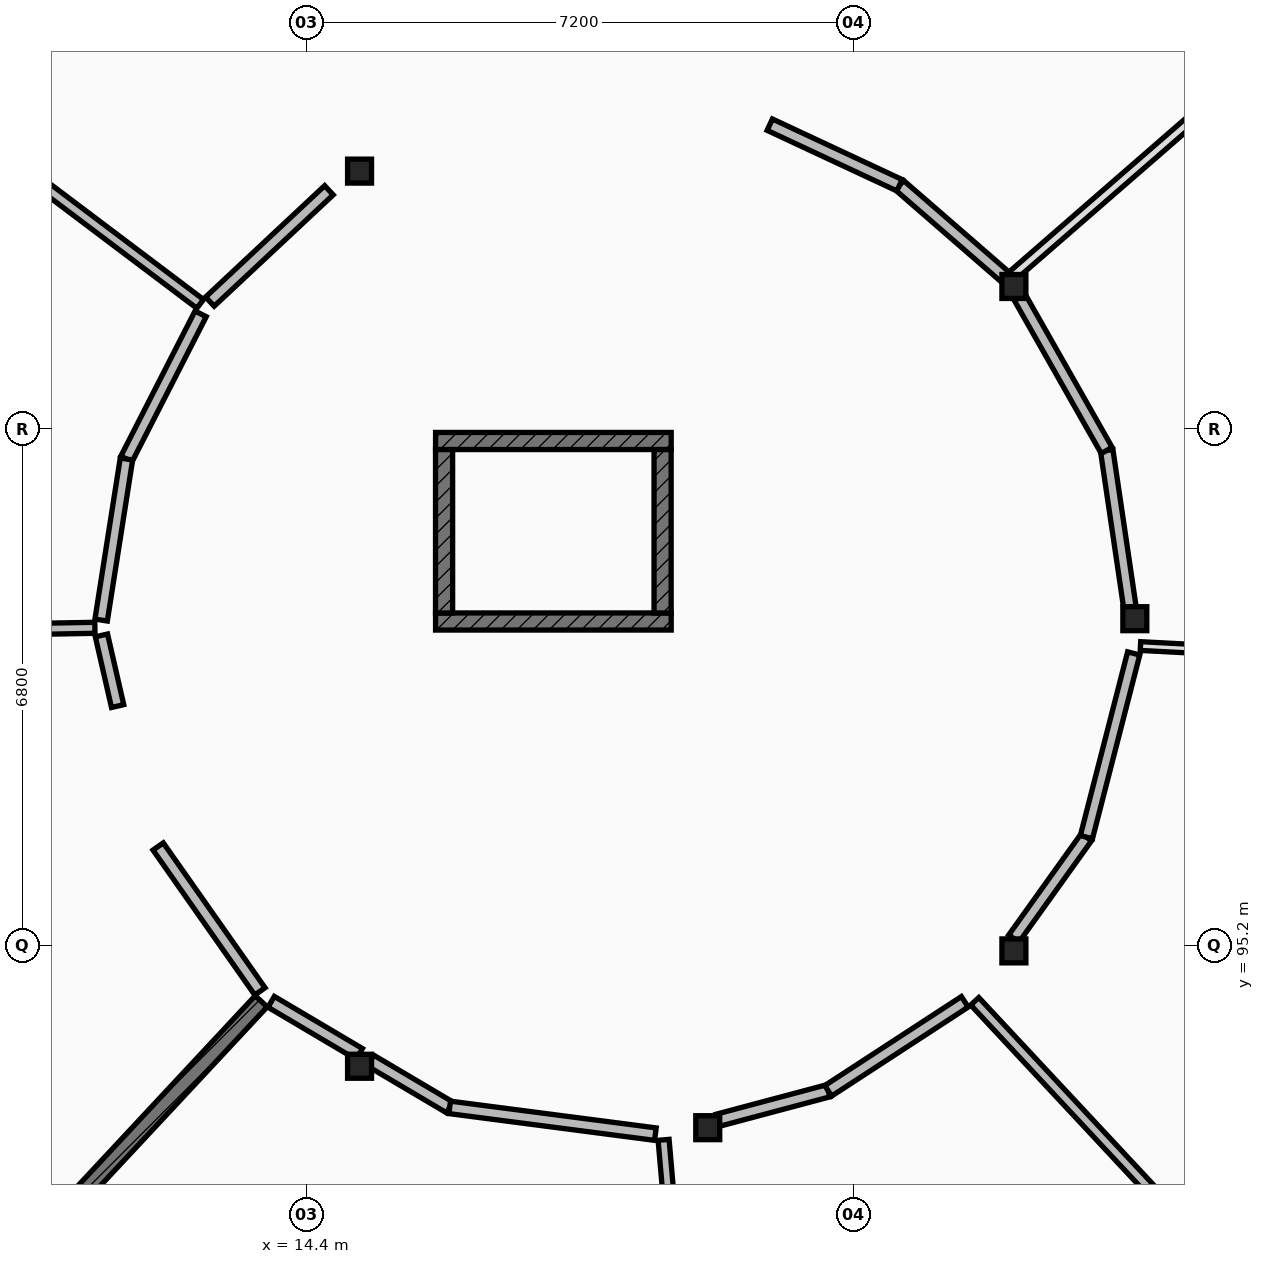
"""IFC4 building model, lengths in metres.
Left out: names, types, materials, properties, quantities, classifications, styles, units other than length and angle.
Written with IfcOpenShell. Run it as: python <this file> out.ifc"""

import sys

from ifc_helpers import new_model, si_unit, direction, frame, frame_2d, origin, origin_2d, place, context, subcontext, project, spatial, rectangle, extrude, element, fill, save


model = new_model("IFC4")
c1 = context("Model", 3, precision=1e-05, world=origin(), true_north=direction((0.0, 1.0)))
c2 = subcontext(c1, "Body", "Model", "MODEL_VIEW")
j1 = project(units=[si_unit("LENGTHUNIT", "METRE"), si_unit("PLANEANGLEUNIT", "RADIAN")], contexts=[c1])
p1 = place(None, origin())
s1 = spatial("IfcSite", under=j1, at=p1, CompositionType="ELEMENT")
p2 = place(p1, origin())
s2 = spatial("IfcBuilding", under=s1, at=p2, CompositionType="ELEMENT")
p3 = place(p2, frame((0.0, 0.0, 12.95)))
s3 = spatial("IfcBuildingStorey", under=s2, at=p3, CompositionType="ELEMENT", Elevation=12.95)
for number, where, z_axis, x_axis in (
    (1, (25.3, 99.5, 0.0), (0.0, 0.0, 1.0), (1.0, 0.0, 0.0)),
    (2, (23.709, 103.871, 0.0), (0.0, 0.0, 1.0), (1.0, 0.0, 0.0)),
    (3, (15.1, 105.389, 0.0), (0.0, 0.0, 1.0), (1.0, 0.0, 0.0)),
    (4, (15.1, 93.611, 0.0), (0.0, 0.0, 1.0), (1.0, 0.0, 0.0)),
    (5, (19.681, 92.803, 0.0), (0.0, 0.0, 1.0), (1.0, 0.0, 0.0)),
    (6, (23.709, 95.129, 0.0), (0.0, 0.0, 1.0), (1.0, 0.0, 0.0)),
):
    element("IfcColumn", number, at=place(p3, frame(where, z_axis=z_axis, x_axis=x_axis)), inside=s3, PredefinedType="COLUMN", context=c2, shape_type="SweptSolid", body=[
        extrude(rectangle(XDim=0.315, YDim=0.315, at=origin_2d()), origin(), (0.0, 0.0, 1.0), 4.2),
    ])
p4 = place(p3, frame((16.1, 99.463, 0.0), z_axis=(0.0, 0.0, 1.0), x_axis=(1.0, 0.0, 0.0)))
e7 = element("IfcWall", 7, at=p4, inside=s3, PredefinedType="SHEAR", context=c2, shape_type="SweptSolid", body=[
    extrude(rectangle(XDim=3.1, YDim=0.225, at=frame_2d((1.55, 0.0))), origin(), (0.0, 0.0, 1.0), 3.995),
])
p5 = place(p4, frame((0.95, 0.0, 0.0)))
e8 = element("IfcOpeningElement", 8, at=p5, cuts=e7, PredefinedType="OPENING", context=c2, shape_type="SweptSolid", body=[
    extrude(rectangle(XDim=1.2, YDim=2.2, at=frame_2d((0.6, 1.1))), frame((0.0, 0.123, 0.0), z_axis=(0.0, -1.0, 0.0), x_axis=(1.0, 0.0, 0.0)), (0.0, 0.0, 1.0), 0.245),
])
p6 = place(p3, frame((16.1, 101.838, 0.0), z_axis=(0.0, 0.0, 1.0), x_axis=(1.0, 0.0, 0.0)))
e9 = element("IfcWall", 9, at=p6, inside=s3, PredefinedType="SHEAR", context=c2, shape_type="SweptSolid", body=[
    extrude(rectangle(XDim=3.1, YDim=0.225, at=frame_2d((1.55, 0.0))), origin(), (0.0, 0.0, 1.0), 3.995),
])
for number, where, z_axis, x_axis in (
    (10, (16.212, 99.575, 0.0), (0.0, 0.0, 1.0), (0.0, 1.0, 0.0)),
    (11, (19.087, 99.575, 0.0), (0.0, 0.0, 1.0), (0.0, 1.0, 0.0)),
):
    element("IfcWall", number, at=place(p3, frame(where, z_axis=z_axis, x_axis=x_axis)), inside=s3, PredefinedType="SHEAR", context=c2, shape_type="SweptSolid", body=[
        extrude(rectangle(XDim=2.15, YDim=0.225, at=frame_2d((1.075, 0.0))), origin(), (0.0, 0.0, 1.0), 3.995),
    ])
p7 = place(p3, frame((13.003, 103.642, 0.0), z_axis=(0.0, 0.0, 1.0), x_axis=(-0.798611576701, 0.601846782462, 0.0)))
e12 = element("IfcWall", 12, at=p7, inside=s3, PredefinedType="PARTITIONING", context=c2, shape_type="SweptSolid", body=[
    extrude(rectangle(XDim=5.875, YDim=0.145, at=frame_2d((2.938, 0.0))), origin(), (0.0, 0.0, 1.0), 3.324),
])
p8 = place(p3, frame((11.618, 99.38, 0.0), z_axis=(0.0, 0.0, 1.0), x_axis=(-0.999840336335, -0.017869018934, 0.0)))
e13 = element("IfcWall", 13, at=p8, inside=s3, PredefinedType="PARTITIONING", context=c2, shape_type="SweptSolid", body=[
    extrude(rectangle(XDim=0.888, YDim=0.145, at=frame_2d((0.444, 0.0))), origin(), (0.0, 0.0, 1.0), 3.324),
])
p9 = place(p3, frame((13.806, 94.466, 0.0), z_axis=(0.0, 0.0, 1.0), x_axis=(-0.681971732264, -0.731378531537, 0.0)))
e14 = element("IfcWall", 14, at=p9, inside=s3, PredefinedType="SOLIDWALL", context=c2, shape_type="SweptSolid", body=[
    extrude(rectangle(XDim=5.875, YDim=0.215, at=frame_2d((2.938, 0.0))), origin(), (0.0, 0.0, 1.0), 3.324),
])
p10 = place(p3, frame((19.1, 92.643, 0.0), z_axis=(0.0, 0.0, 1.0), x_axis=(0.087091071421, -0.996200353984, 0.0)))
e15 = element("IfcWall", 15, at=p10, inside=s3, PredefinedType="PARTITIONING", context=c2, shape_type="SweptSolid", body=[
    extrude(rectangle(XDim=5.867, YDim=0.145, at=frame_2d((2.934, 0.0))), origin(), (0.0, 0.0, 1.0), 3.324),
])
p11 = place(p3, frame((23.194, 94.466, 0.0), z_axis=(0.0, 0.0, 1.0), x_axis=(0.681971732264, -0.731378531537, 0.0)))
e16 = element("IfcWall", 16, at=p11, inside=s3, PredefinedType="PARTITIONING", context=c2, shape_type="SweptSolid", body=[
    extrude(rectangle(XDim=5.875, YDim=0.145, at=frame_2d((2.938, 0.0))), origin(), (0.0, 0.0, 1.0), 3.324),
])
p12 = place(p3, frame((25.374, 99.14, 0.0), z_axis=(0.0, 0.0, 1.0), x_axis=(0.998625625662, -0.052410492944, 0.0)))
e17 = element("IfcWall", 17, at=p12, inside=s3, PredefinedType="PARTITIONING", context=c2, shape_type="SweptSolid", body=[
    extrude(rectangle(XDim=5.874, YDim=0.115, at=frame_2d((2.937, 0.0))), origin(), (0.0, 0.0, 1.0), 3.324),
])
p13 = place(p3, frame((23.695, 104.016, 0.0), z_axis=(0.0, 0.0, 1.0), x_axis=(0.754647404393, 0.656130547256, 0.0)))
e18 = element("IfcWall", 18, at=p13, inside=s3, PredefinedType="PLUMBINGWALL", context=c2, shape_type="SweptSolid", body=[
    extrude(rectangle(XDim=5.898, YDim=0.135, at=frame_2d((2.949, 0.0))), origin(), (0.0, 0.0, 1.0), 3.324),
])
p14 = place(p3, frame((14.697, 105.137, 0.0), z_axis=(0.0, 0.0, 1.0), x_axis=(-0.73028240744, -0.683145376464, 0.0)))
e19 = element("IfcWall", 19, at=p14, inside=s3, PredefinedType="PARTITIONING", context=c2, shape_type="SweptSolid", body=[
    extrude(rectangle(XDim=2.144, YDim=0.165, at=frame_2d((1.072, 0.0))), origin(), (0.0, 0.0, 1.0), 3.324),
])
p15 = place(p14, frame((0.453, 0.0, 0.0)))
e20 = element("IfcOpeningElement", 20, at=p15, cuts=e19, PredefinedType="OPENING", context=c2, shape_type="SweptSolid", body=[
    extrude(rectangle(XDim=1.24, YDim=2.22, at=frame_2d((0.62, 1.11))), frame((0.0, 0.093, 0.0), z_axis=(0.0, -1.0, 0.0), x_axis=(1.0, 0.0, 0.0)), (0.0, 0.0, 1.0), 0.185),
])
p16 = place(p3, frame((13.009, 103.511, 0.0), z_axis=(0.0, 0.0, 1.0), x_axis=(-0.455072954242, -0.890454157337, 0.0)))
e21 = element("IfcWall", 21, at=p16, inside=s3, PredefinedType="PARTITIONING", context=c2, shape_type="SweptSolid", body=[
    extrude(rectangle(XDim=2.145, YDim=0.165, at=frame_2d((1.072, 0.0))), origin(), (0.0, 0.0, 1.0), 3.324),
])
p17 = place(p16, frame((0.433, 0.0, 0.0)))
e22 = element("IfcOpeningElement", 22, at=p17, cuts=e21, PredefinedType="OPENING", context=c2, shape_type="SweptSolid", body=[
    extrude(rectangle(XDim=1.28, YDim=2.3, at=frame_2d((0.64, 1.15))), frame((0.0, 0.093, 0.0), z_axis=(0.0, -1.0, 0.0), x_axis=(1.0, 0.0, 0.0)), (0.0, 0.0, 1.0), 0.185),
])
p18 = place(p3, frame((12.033, 101.601, 0.0), z_axis=(0.0, 0.0, 1.0), x_axis=(-0.155237833992, -0.987877125404, 0.0)))
e23 = element("IfcWall", 23, at=p18, inside=s3, PredefinedType="PARTITIONING", context=c2, shape_type="SweptSolid", body=[
    extrude(rectangle(XDim=2.145, YDim=0.165, at=frame_2d((1.073, 0.0))), origin(), (0.0, 0.0, 1.0), 3.324),
])
p19 = place(p3, frame((11.704, 99.28, 0.0), z_axis=(0.0, 0.0, 1.0), x_axis=(0.223158332348, -0.974782210909, 0.0)))
e24 = element("IfcWall", 24, at=p19, inside=s3, PredefinedType="PARTITIONING", context=c2, shape_type="SweptSolid", body=[
    extrude(rectangle(XDim=0.954, YDim=0.165, at=frame_2d((0.477, 0.0))), origin(), (0.0, 0.0, 1.0), 3.324),
])
p20 = place(p3, frame((12.45, 96.503, 0.0), z_axis=(0.0, 0.0, 1.0), x_axis=(0.574678200401, -0.818379475539, 0.0)))
e25 = element("IfcWall", 25, at=p20, inside=s3, PredefinedType="PARTITIONING", context=c2, shape_type="SweptSolid", body=[
    extrude(rectangle(XDim=2.33, YDim=0.165, at=frame_2d((1.165, 0.0))), origin(), (0.0, 0.0, 1.0), 3.324),
])
p21 = place(p20, frame((0.495, 0.0, 0.0)))
e26 = element("IfcOpeningElement", 26, at=p21, cuts=e25, PredefinedType="OPENING", context=c2, shape_type="SweptSolid", body=[
    extrude(rectangle(XDim=1.34, YDim=2.32, at=frame_2d((0.67, 1.16))), frame((0.0, 0.093, 0.0), z_axis=(0.0, -1.0, 0.0), x_axis=(1.0, 0.0, 0.0)), (0.0, 0.0, 1.0), 0.185),
])
p22 = place(p3, frame((13.937, 94.459, 0.0), z_axis=(0.0, 0.0, 1.0), x_axis=(0.860532897503, -0.509394868756, 0.0)))
e27 = element("IfcWall", 27, at=p22, inside=s3, PredefinedType="PARTITIONING", context=c2, shape_type="SweptSolid", body=[
    extrude(rectangle(XDim=1.347, YDim=0.165, at=frame_2d((0.673, 0.0))), origin(), (0.0, 0.0, 1.0), 3.324),
])
p23 = place(p22, frame((0.224, 0.0, 0.0)))
e28 = element("IfcOpeningElement", 28, at=p23, cuts=e27, PredefinedType="OPENING", context=c2, shape_type="SweptSolid", body=[
    extrude(rectangle(XDim=0.9, YDim=2.1, at=frame_2d((0.45, 1.05))), frame((0.0, 0.093, 0.0), z_axis=(0.0, -1.0, 0.0), x_axis=(1.0, 0.0, 0.0)), (0.0, 0.0, 1.0), 0.185),
])
p24 = place(p3, frame((15.244, 93.686, 0.0), z_axis=(0.0, 0.0, 1.0), x_axis=(0.860838176747, -0.508878800359, 0.0)))
e29 = element("IfcWall", 29, at=p24, inside=s3, PredefinedType="PARTITIONING", context=c2, shape_type="SweptSolid", body=[
    extrude(rectangle(XDim=1.21, YDim=0.165, at=frame_2d((0.605, 0.0))), origin(), (0.0, 0.0, 1.0), 3.324),
])
p25 = place(p3, frame((16.286, 93.07, 0.0), z_axis=(0.0, 0.0, 1.0), x_axis=(0.991643260492, -0.12901024735, 0.0)))
e30 = element("IfcWall", 30, at=p25, inside=s3, PredefinedType="PARTITIONING", context=c2, shape_type="SweptSolid", body=[
    extrude(rectangle(XDim=2.729, YDim=0.165, at=frame_2d((1.364, 0.0))), origin(), (0.0, 0.0, 1.0), 3.324),
])
p26 = place(p3, frame((19.811, 92.9, 0.0), z_axis=(0.0, 0.0, 1.0), x_axis=(0.966208027206, 0.257763550882, 0.0)))
e31 = element("IfcWall", 31, at=p26, inside=s3, PredefinedType="PARTITIONING", context=c2, shape_type="SweptSolid", body=[
    extrude(rectangle(XDim=1.506, YDim=0.165, at=frame_2d((0.753, 0.0))), origin(), (0.0, 0.0, 1.0), 3.324),
])
p27 = place(p26, frame((0.293, 0.0, 0.0)))
e32 = element("IfcOpeningElement", 32, at=p27, cuts=e31, PredefinedType="OPENING", context=c2, shape_type="SweptSolid", body=[
    extrude(rectangle(XDim=0.92, YDim=2.12, at=frame_2d((0.46, 1.06))), frame((0.0, 0.093, 0.0), z_axis=(0.0, -1.0, 0.0), x_axis=(1.0, 0.0, 0.0)), (0.0, 0.0, 1.0), 0.185),
])
p28 = place(p3, frame((21.266, 93.288, 0.0), z_axis=(0.0, 0.0, 1.0), x_axis=(0.837818879473, 0.5459482807, 0.0)))
e33 = element("IfcWall", 33, at=p28, inside=s3, PredefinedType="PARTITIONING", context=c2, shape_type="SweptSolid", body=[
    extrude(rectangle(XDim=2.145, YDim=0.165, at=frame_2d((1.072, 0.0))), origin(), (0.0, 0.0, 1.0), 3.324),
])
p29 = place(p3, frame((23.708, 95.291, 0.0), z_axis=(0.0, 0.0, 1.0), x_axis=(0.581857090846, 0.813291046202, 0.0)))
e34 = element("IfcWall", 34, at=p29, inside=s3, PredefinedType="PARTITIONING", context=c2, shape_type="SweptSolid", body=[
    extrude(rectangle(XDim=1.641, YDim=0.165, at=frame_2d((0.821, 0.0))), origin(), (0.0, 0.0, 1.0), 3.324),
])
p30 = place(p29, frame((0.341, 0.0, 0.0)))
e35 = element("IfcOpeningElement", 35, at=p30, cuts=e34, PredefinedType="OPENING", context=c2, shape_type="SweptSolid", body=[
    extrude(rectangle(XDim=0.96, YDim=2.12, at=frame_2d((0.48, 1.06))), frame((0.0, 0.093, 0.0), z_axis=(0.0, -1.0, 0.0), x_axis=(1.0, 0.0, 0.0)), (0.0, 0.0, 1.0), 0.185),
])
p31 = place(p3, frame((24.663, 96.626, 0.0), z_axis=(0.0, 0.0, 1.0), x_axis=(0.249159011618, 0.968462589329, 0.0)))
e36 = element("IfcWall", 36, at=p31, inside=s3, PredefinedType="PARTITIONING", context=c2, shape_type="SweptSolid", body=[
    extrude(rectangle(XDim=2.496, YDim=0.165, at=frame_2d((1.248, 0.0))), origin(), (0.0, 0.0, 1.0), 3.324),
])
p32 = place(p3, frame((25.235, 99.649, 0.0), z_axis=(0.0, 0.0, 1.0), x_axis=(-0.14618415224, 0.989257395036, 0.0)))
e37 = element("IfcWall", 37, at=p32, inside=s3, PredefinedType="PARTITIONING", context=c2, shape_type="SweptSolid", body=[
    extrude(rectangle(XDim=2.088, YDim=0.165, at=frame_2d((1.044, 0.0))), origin(), (0.0, 0.0, 1.0), 3.324),
])
p33 = place(p32, frame((0.604, 0.0, 0.0)))
e38 = element("IfcOpeningElement", 38, at=p33, cuts=e37, PredefinedType="OPENING", context=c2, shape_type="SweptSolid", body=[
    extrude(rectangle(XDim=0.88, YDim=2.1, at=frame_2d((0.44, 1.05))), frame((0.0, 0.093, 0.0), z_axis=(0.0, -1.0, 0.0), x_axis=(1.0, 0.0, 0.0)), (0.0, 0.0, 1.0), 0.185),
])
p34 = place(p3, frame((24.93, 101.714, 0.0), z_axis=(0.0, 0.0, 1.0), x_axis=(-0.493935156124, 0.869498741543, 0.0)))
e39 = element("IfcWall", 39, at=p34, inside=s3, PredefinedType="PARTITIONING", context=c2, shape_type="SweptSolid", body=[
    extrude(rectangle(XDim=2.316, YDim=0.165, at=frame_2d((1.158, 0.0))), origin(), (0.0, 0.0, 1.0), 3.324),
])
p35 = place(p3, frame((23.6, 103.991, 0.0), z_axis=(0.0, 0.0, 1.0), x_axis=(-0.755139781187, 0.65556381144, 0.0)))
e40 = element("IfcWall", 40, at=p35, inside=s3, PredefinedType="PARTITIONING", context=c2, shape_type="SweptSolid", body=[
    extrude(rectangle(XDim=1.849, YDim=0.165, at=frame_2d((0.924, 0.0))), origin(), (0.0, 0.0, 1.0), 3.324),
])
p36 = place(p35, frame((0.454, 0.0, 0.0)))
e41 = element("IfcOpeningElement", 41, at=p36, cuts=e40, PredefinedType="OPENING", context=c2, shape_type="SweptSolid", body=[
    extrude(rectangle(XDim=0.94, YDim=2.1, at=frame_2d((0.47, 1.05))), frame((0.0, 0.093, 0.0), z_axis=(0.0, -1.0, 0.0), x_axis=(1.0, 0.0, 0.0)), (0.0, 0.0, 1.0), 0.185),
])
p37 = place(p3, frame((22.204, 105.203, 0.0), z_axis=(0.0, 0.0, 1.0), x_axis=(-0.906080483262, 0.423105374407, 0.0)))
e42 = element("IfcWall", 42, at=p37, inside=s3, PredefinedType="PARTITIONING", context=c2, shape_type="SweptSolid", body=[
    extrude(rectangle(XDim=1.884, YDim=0.165, at=frame_2d((0.942, 0.0))), origin(), (0.0, 0.0, 1.0), 3.324),
])
p38 = place(p5, origin())
e43 = element("IfcDoor", 43, at=p38, inside=s3, OperationType="DOUBLE_DOOR_SLIDING", PredefinedType="DOOR", context=c2, shape_type="SweptSolid", body=[
    extrude(rectangle(XDim=1.2, YDim=2.2, at=frame_2d((0.6, 1.1))), frame((0.0, 0.025, 0.0), z_axis=(0.0, -1.0, 0.0), x_axis=(1.0, 0.0, 0.0)), (0.0, 0.0, 1.0), 0.05),
])
fill(e8, e43)
p39 = place(p15, origin())
e44 = element("IfcDoor", 44, at=p39, inside=s3, OperationType="SINGLE_SWING_LEFT", PredefinedType="DOOR", context=c2, shape_type="SweptSolid", body=[
    extrude(rectangle(XDim=1.24, YDim=2.22, at=frame_2d((0.62, 1.11))), frame((0.0, 0.025, 0.0), z_axis=(0.0, -1.0, 0.0), x_axis=(1.0, 0.0, 0.0)), (0.0, 0.0, 1.0), 0.05),
])
fill(e20, e44)
p40 = place(p17, origin())
e45 = element("IfcDoor", 45, at=p40, inside=s3, OperationType="SINGLE_SWING_RIGHT", PredefinedType="DOOR", context=c2, shape_type="SweptSolid", body=[
    extrude(rectangle(XDim=1.28, YDim=2.3, at=frame_2d((0.64, 1.15))), frame((0.0, 0.025, 0.0), z_axis=(0.0, -1.0, 0.0), x_axis=(1.0, 0.0, 0.0)), (0.0, 0.0, 1.0), 0.05),
])
fill(e22, e45)
p41 = place(p21, origin())
e46 = element("IfcDoor", 46, at=p41, inside=s3, OperationType="SINGLE_SWING_LEFT", PredefinedType="DOOR", context=c2, shape_type="SweptSolid", body=[
    extrude(rectangle(XDim=1.34, YDim=2.32, at=frame_2d((0.67, 1.16))), frame((0.0, 0.025, 0.0), z_axis=(0.0, -1.0, 0.0), x_axis=(1.0, 0.0, 0.0)), (0.0, 0.0, 1.0), 0.05),
])
fill(e26, e46)
p42 = place(p23, origin())
e47 = element("IfcDoor", 47, at=p42, inside=s3, OperationType="SINGLE_SWING_RIGHT", PredefinedType="DOOR", context=c2, shape_type="SweptSolid", body=[
    extrude(rectangle(XDim=0.9, YDim=2.1, at=frame_2d((0.45, 1.05))), frame((0.0, 0.025, 0.0), z_axis=(0.0, -1.0, 0.0), x_axis=(1.0, 0.0, 0.0)), (0.0, 0.0, 1.0), 0.05),
])
fill(e28, e47)
p43 = place(p27, origin())
e48 = element("IfcDoor", 48, at=p43, inside=s3, OperationType="SINGLE_SWING_LEFT", PredefinedType="DOOR", context=c2, shape_type="SweptSolid", body=[
    extrude(rectangle(XDim=0.92, YDim=2.12, at=frame_2d((0.46, 1.06))), frame((0.0, 0.025, 0.0), z_axis=(0.0, -1.0, 0.0), x_axis=(1.0, 0.0, 0.0)), (0.0, 0.0, 1.0), 0.05),
])
fill(e32, e48)
p44 = place(p30, origin())
e49 = element("IfcDoor", 49, at=p44, inside=s3, OperationType="SINGLE_SWING_RIGHT", PredefinedType="DOOR", context=c2, shape_type="SweptSolid", body=[
    extrude(rectangle(XDim=0.96, YDim=2.12, at=frame_2d((0.48, 1.06))), frame((0.0, 0.025, 0.0), z_axis=(0.0, -1.0, 0.0), x_axis=(1.0, 0.0, 0.0)), (0.0, 0.0, 1.0), 0.05),
])
fill(e35, e49)
p45 = place(p33, origin())
e50 = element("IfcDoor", 50, at=p45, inside=s3, OperationType="SINGLE_SWING_LEFT", PredefinedType="DOOR", context=c2, shape_type="SweptSolid", body=[
    extrude(rectangle(XDim=0.88, YDim=2.1, at=frame_2d((0.44, 1.05))), frame((0.0, 0.025, 0.0), z_axis=(0.0, -1.0, 0.0), x_axis=(1.0, 0.0, 0.0)), (0.0, 0.0, 1.0), 0.05),
])
fill(e38, e50)
p46 = place(p36, origin())
e51 = element("IfcDoor", 51, at=p46, inside=s3, OperationType="SINGLE_SWING_RIGHT", PredefinedType="DOOR", context=c2, shape_type="SweptSolid", body=[
    extrude(rectangle(XDim=0.94, YDim=2.1, at=frame_2d((0.47, 1.05))), frame((0.0, 0.025, 0.0), z_axis=(0.0, -1.0, 0.0), x_axis=(1.0, 0.0, 0.0)), (0.0, 0.0, 1.0), 0.05),
])
fill(e41, e51)
save(model, sys.argv[1])
